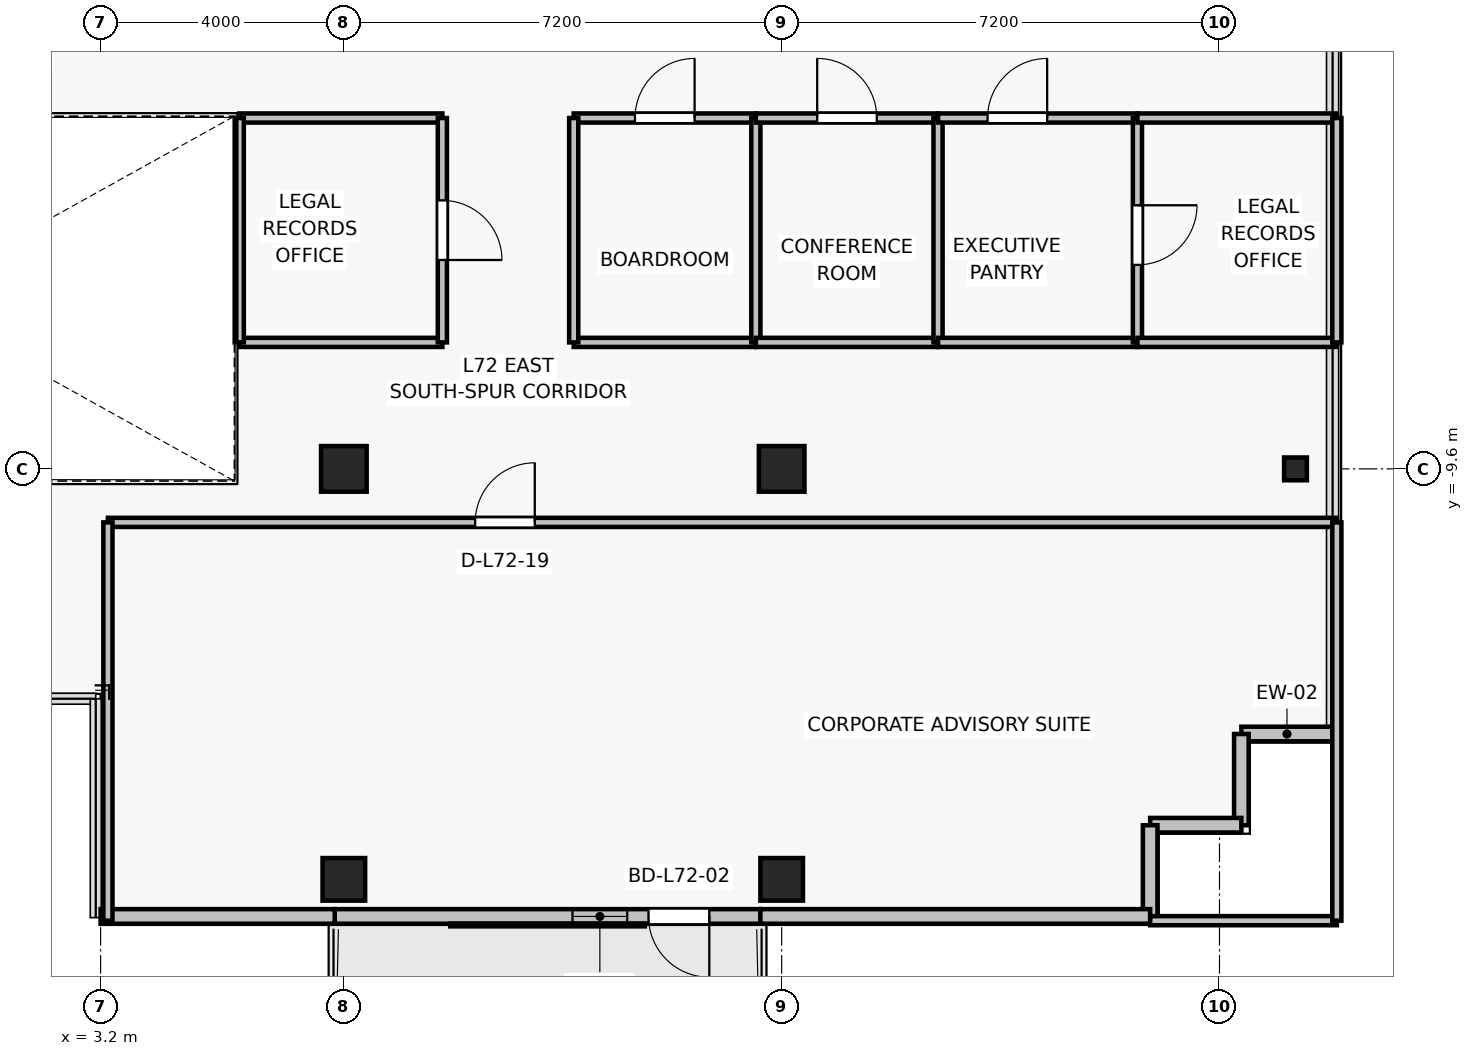
"""IFC4 building model, lengths in metres.
Left out: names, types, materials, properties, quantities, classifications, styles, units other than length and angle.
Written with IfcOpenShell. Run it as: python <this file> out.ifc"""

import sys

from ifc_helpers import new_model, si_unit, direction, frame, frame_2d, origin, origin_2d, place, context, subcontext, project, spatial, rectangle, i_section, extrude, source, transform, mapped, element, fill, save


model = new_model("IFC4")
c1 = context("Model", 3, precision=1e-05, world=origin(), true_north=direction((0.0, 1.0)))
c2 = subcontext(c1, "Body", "Model", "MODEL_VIEW")
j1 = project(units=[si_unit("LENGTHUNIT", "METRE"), si_unit("PLANEANGLEUNIT", "RADIAN")], contexts=[c1])
p1 = place(None, origin())
s1 = spatial("IfcSite", under=j1, at=p1, CompositionType="ELEMENT")
p2 = place(p1, origin())
s2 = spatial("IfcBuilding", under=s1, at=p2, CompositionType="ELEMENT")
p3 = place(p2, frame((0.0, 0.0, 255.1)))
s3 = spatial("IfcBuildingStorey", under=s2, at=p3, CompositionType="ELEMENT", Elevation=255.1)
for number, where, z_axis, x_axis in (
    (1, (7.2, -9.6, 0.0), (0.0, 0.0, 1.0), (1.0, 0.0, 0.0)),
    (2, (14.4, -9.6, 0.0), (0.0, 0.0, 1.0), (1.0, 0.0, 0.0)),
):
    element("IfcColumn", number, at=place(p3, frame(where, z_axis=z_axis, x_axis=x_axis)), inside=s3, PredefinedType="COLUMN", context=c2, shape_type="SweptSolid", body=[
        extrude(rectangle(XDim=0.75, YDim=0.75, at=origin_2d()), origin(), (0.0, 0.0, 1.0), 3.3),
    ])
for number, where, z_axis, x_axis in (
    (3, (7.2, -16.35, 0.0), (0.0, 0.0, 1.0), (1.0, 0.0, 0.0)),
    (4, (14.4, -16.35, 0.0), (0.0, 0.0, 1.0), (1.0, 0.0, 0.0)),
):
    element("IfcColumn", number, at=place(p3, frame(where, z_axis=z_axis, x_axis=x_axis)), inside=s3, PredefinedType="COLUMN", context=c2, shape_type="SweptSolid", body=[
        extrude(rectangle(XDim=0.7, YDim=0.7, at=origin_2d()), origin(), (0.0, 0.0, 1.0), 3.3),
    ])
p4 = place(p3, frame((22.85, -9.6, 0.0), z_axis=(0.0, 0.0, 1.0), x_axis=(1.0, 0.0, 0.0)))
e5 = element("IfcColumn", 5, at=p4, inside=s3, PredefinedType="COLUMN", context=c2, shape_type="SweptSolid", body=[
    extrude(i_section(OverallWidth=0.375, OverallDepth=0.375, WebThickness=0.017, FlangeThickness=0.027, FilletRadius=0.015, at=origin_2d()), origin(), (0.0, 0.0, 1.0), 3.3),
])
p5 = place(p3, frame((14.05, -16.96, 0.0), z_axis=(0.0, 0.0, 1.0), x_axis=(-1.0, 0.0, 0.0)))
e6 = element("IfcWall", 6, at=p5, inside=s3, PredefinedType="SOLIDWALL", context=c2, shape_type="SweptSolid", body=[
    extrude(rectangle(XDim=7.0, YDim=0.24, at=frame_2d((3.5, 0.0))), origin(), (0.0, 0.0, 1.0), 3.075),
])
p6 = place(p5, frame((0.84, 0.0, 0.0)))
e7 = element("IfcOpeningElement", 7, at=p6, cuts=e6, PredefinedType="OPENING", context=c2, shape_type="SweptSolid", body=[
    extrude(rectangle(XDim=1.0, YDim=2.2, at=frame_2d((0.5, 1.1))), frame((0.0, 0.13, 0.0), z_axis=(0.0, -1.0, 0.0), x_axis=(1.0, 0.0, 0.0)), (0.0, 0.0, 1.0), 0.26),
])
p7 = place(p5, frame((2.19, 0.0, 0.85)))
e8 = element("IfcOpeningElement", 8, at=p7, cuts=e6, PredefinedType="OPENING", context=c2, shape_type="SweptSolid", body=[
    extrude(rectangle(XDim=0.9, YDim=1.35, at=frame_2d((0.45, 0.675))), frame((0.0, 0.13, 0.0), z_axis=(0.0, -1.0, 0.0), x_axis=(1.0, 0.0, 0.0)), (0.0, 0.0, 1.0), 0.26),
])
for number, where, z_axis, x_axis in (
    (9, (21.96, -13.96, 0.0), (0.0, 0.0, 1.0), (1.0, 0.0, 0.0)),
    (10, (21.96, -15.46, 0.0), (0.0, 0.0, 1.0), (0.0, 1.0, 0.0)),
    (11, (20.46, -15.46, 0.0), (0.0, 0.0, 1.0), (1.0, 0.0, 0.0)),
    (12, (20.46, -16.96, 0.0), (0.0, 0.0, 1.0), (0.0, 1.0, 0.0)),
):
    element("IfcWall", number, at=place(p3, frame(where, z_axis=z_axis, x_axis=x_axis)), inside=s3, PredefinedType="SOLIDWALL", context=c2, shape_type="SweptSolid", body=[
        extrude(rectangle(XDim=1.5, YDim=0.24, at=frame_2d((0.75, 0.0))), origin(), (0.0, 0.0, 1.0), 3.075),
    ])
p8 = place(p3, frame((14.05, -16.96, 0.0), z_axis=(0.0, 0.0, 1.0), x_axis=(1.0, 0.0, 0.0)))
e13 = element("IfcWall", 13, at=p8, inside=s3, PredefinedType="SOLIDWALL", context=c2, shape_type="SweptSolid", body=[
    extrude(rectangle(XDim=6.41, YDim=0.24, at=frame_2d((3.205, 0.0))), origin(), (0.0, 0.0, 1.0), 3.075),
])
p9 = place(p3, frame((3.2, -16.96, 0.0), z_axis=(0.0, 0.0, 1.0), x_axis=(1.0, 0.0, 0.0)))
e14 = element("IfcWall", 14, at=p9, inside=s3, PredefinedType="SOLIDWALL", context=c2, shape_type="SweptSolid", body=[
    extrude(rectangle(XDim=3.85, YDim=0.24, at=frame_2d((1.925, 0.0))), origin(), (0.0, 0.0, 1.0), 3.075),
])
p10 = place(p3, frame((13.976, -7.52, 0.0), z_axis=(0.0, 0.0, 1.0), x_axis=(-1.0, 0.0, 0.0)))
e15 = element("IfcWall", 15, at=p10, inside=s3, PredefinedType="PARTITIONING", context=c2, shape_type="SweptSolid", body=[
    extrude(rectangle(XDim=2.996, YDim=0.15, at=frame_2d((1.498, 0.0))), origin(), (0.0, 0.0, 1.0), 3.075),
])
p11 = place(p3, frame((10.98, -3.83, 0.0), z_axis=(0.0, 0.0, 1.0), x_axis=(1.0, 0.0, 0.0)))
e16 = element("IfcWall", 16, at=p11, inside=s3, PredefinedType="PARTITIONING", context=c2, shape_type="SweptSolid", body=[
    extrude(rectangle(XDim=2.996, YDim=0.15, at=frame_2d((1.498, 0.0))), origin(), (0.0, 0.0, 1.0), 3.075),
])
p12 = place(p11, frame((1.008, 0.0, 0.0)))
e17 = element("IfcOpeningElement", 17, at=p12, cuts=e16, PredefinedType="OPENING", context=c2, shape_type="SweptSolid", body=[
    extrude(rectangle(XDim=0.98, YDim=2.15, at=frame_2d((0.49, 1.075))), frame((0.0, 0.085, 0.0), z_axis=(0.0, -1.0, 0.0), x_axis=(1.0, 0.0, 0.0)), (0.0, 0.0, 1.0), 0.17),
])
for number, where, z_axis, x_axis in (
    (18, (10.98, -7.52, 0.0), (0.0, 0.0, 1.0), (0.0, 1.0, 0.0)),
    (19, (13.976, -3.83, 0.0), (0.0, 0.0, 1.0), (0.0, -1.0, 0.0)),
):
    element("IfcWall", number, at=place(p3, frame(where, z_axis=z_axis, x_axis=x_axis)), inside=s3, PredefinedType="PARTITIONING", context=c2, shape_type="SweptSolid", body=[
        extrude(rectangle(XDim=3.69, YDim=0.15, at=frame_2d((1.845, 0.0))), origin(), (0.0, 0.0, 1.0), 2.705),
    ])
p13 = place(p3, frame((16.971, -7.52, 0.0), z_axis=(0.0, 0.0, 1.0), x_axis=(-1.0, 0.0, 0.0)))
e20 = element("IfcWall", 20, at=p13, inside=s3, PredefinedType="PARTITIONING", context=c2, shape_type="SweptSolid", body=[
    extrude(rectangle(XDim=2.996, YDim=0.15, at=frame_2d((1.498, 0.0))), origin(), (0.0, 0.0, 1.0), 2.615),
])
p14 = place(p3, frame((13.976, -3.83, 0.0), z_axis=(0.0, 0.0, 1.0), x_axis=(1.0, 0.0, 0.0)))
e21 = element("IfcWall", 21, at=p14, inside=s3, PredefinedType="PARTITIONING", context=c2, shape_type="SweptSolid", body=[
    extrude(rectangle(XDim=2.996, YDim=0.15, at=frame_2d((1.498, 0.0))), origin(), (0.0, 0.0, 1.0), 2.615),
])
p15 = place(p14, frame((1.008, 0.0, 0.0)))
e22 = element("IfcOpeningElement", 22, at=p15, cuts=e21, PredefinedType="OPENING", context=c2, shape_type="SweptSolid", body=[
    extrude(rectangle(XDim=0.98, YDim=2.15, at=frame_2d((0.49, 1.075))), frame((0.0, 0.085, 0.0), z_axis=(0.0, -1.0, 0.0), x_axis=(1.0, 0.0, 0.0)), (0.0, 0.0, 1.0), 0.17),
])
p16 = place(p3, frame((16.971, -3.83, 0.0), z_axis=(0.0, 0.0, 1.0), x_axis=(0.0, -1.0, 0.0)))
e23 = element("IfcWall", 23, at=p16, inside=s3, PredefinedType="PARTITIONING", context=c2, shape_type="SweptSolid", body=[
    extrude(rectangle(XDim=3.69, YDim=0.15, at=frame_2d((1.845, 0.0))), origin(), (0.0, 0.0, 1.0), 2.705),
])
p17 = place(p3, frame((20.251, -7.52, 0.0), z_axis=(0.0, 0.0, 1.0), x_axis=(-1.0, 0.0, 0.0)))
e24 = element("IfcWall", 24, at=p17, inside=s3, PredefinedType="PARTITIONING", context=c2, shape_type="SweptSolid", body=[
    extrude(rectangle(XDim=3.279, YDim=0.15, at=frame_2d((1.64, 0.0))), origin(), (0.0, 0.0, 1.0), 3.075),
])
p18 = place(p3, frame((16.971, -3.83, 0.0), z_axis=(0.0, 0.0, 1.0), x_axis=(1.0, 0.0, 0.0)))
e25 = element("IfcWall", 25, at=p18, inside=s3, PredefinedType="PARTITIONING", context=c2, shape_type="SweptSolid", body=[
    extrude(rectangle(XDim=3.279, YDim=0.15, at=frame_2d((1.64, 0.0))), origin(), (0.0, 0.0, 1.0), 3.075),
])
p19 = place(p18, frame((0.815, 0.0, 0.0)))
e26 = element("IfcOpeningElement", 26, at=p19, cuts=e25, PredefinedType="OPENING", context=c2, shape_type="SweptSolid", body=[
    extrude(rectangle(XDim=0.98, YDim=2.15, at=frame_2d((0.49, 1.075))), frame((0.0, 0.085, 0.0), z_axis=(0.0, -1.0, 0.0), x_axis=(1.0, 0.0, 0.0)), (0.0, 0.0, 1.0), 0.17),
])
p20 = place(p3, frame((20.251, -3.83, 0.0), z_axis=(0.0, 0.0, 1.0), x_axis=(0.0, -1.0, 0.0)))
e27 = element("IfcWall", 27, at=p20, inside=s3, PredefinedType="PARTITIONING", context=c2, shape_type="SweptSolid", body=[
    extrude(rectangle(XDim=3.69, YDim=0.15, at=frame_2d((1.845, 0.0))), origin(), (0.0, 0.0, 1.0), 2.705),
])
p21 = place(p20, frame((1.435, 0.0, 0.0)))
e28 = element("IfcOpeningElement", 28, at=p21, cuts=e27, PredefinedType="OPENING", context=c2, shape_type="SweptSolid", body=[
    extrude(rectangle(XDim=0.98, YDim=2.15, at=frame_2d((0.49, 1.075))), frame((0.0, 0.085, 0.0), z_axis=(0.0, -1.0, 0.0), x_axis=(1.0, 0.0, 0.0)), (0.0, 0.0, 1.0), 0.17),
])
for number, where, z_axis, x_axis in (
    (29, (23.53, -7.52, 0.0), (0.0, 0.0, 1.0), (-1.0, 0.0, 0.0)),
    (30, (20.251, -3.83, 0.0), (0.0, 0.0, 1.0), (1.0, 0.0, 0.0)),
):
    element("IfcWall", number, at=place(p3, frame(where, z_axis=z_axis, x_axis=x_axis)), inside=s3, PredefinedType="PARTITIONING", context=c2, shape_type="SweptSolid", body=[
        extrude(rectangle(XDim=3.279, YDim=0.15, at=frame_2d((1.64, 0.0))), origin(), (0.0, 0.0, 1.0), 2.765),
    ])
p22 = place(p3, frame((23.53, -3.83, 0.0), z_axis=(0.0, 0.0, 1.0), x_axis=(0.0, -1.0, 0.0)))
e31 = element("IfcWall", 31, at=p22, inside=s3, PredefinedType="PARTITIONING", context=c2, shape_type="SweptSolid", body=[
    extrude(rectangle(XDim=3.69, YDim=0.15, at=frame_2d((1.845, 0.0))), origin(), (0.0, 0.0, 1.0), 2.765),
])
p23 = place(p3, frame((23.53, -17.03, 0.0), z_axis=(0.0, 0.0, 1.0), x_axis=(-1.0, 0.0, 0.0)))
e32 = element("IfcWall", 32, at=p23, inside=s3, PredefinedType="PARTITIONING", context=c2, shape_type="SweptSolid", body=[
    extrude(rectangle(XDim=3.07, YDim=0.15, at=frame_2d((1.535, 0.0))), origin(), (0.0, 0.0, 1.0), 3.075),
])
p24 = place(p3, frame((3.32, -10.48, 0.0), z_axis=(0.0, 0.0, 1.0), x_axis=(1.0, 0.0, 0.0)))
e33 = element("IfcWall", 33, at=p24, inside=s3, PredefinedType="PARTITIONING", context=c2, shape_type="SweptSolid", body=[
    extrude(rectangle(XDim=20.21, YDim=0.15, at=frame_2d((10.105, 0.0))), origin(), (0.0, 0.0, 1.0), 2.615),
])
p25 = place(p24, frame((6.04, 0.0, 0.0)))
e34 = element("IfcOpeningElement", 34, at=p25, cuts=e33, PredefinedType="OPENING", context=c2, shape_type="SweptSolid", body=[
    extrude(rectangle(XDim=0.98, YDim=2.15, at=frame_2d((0.49, 1.075))), frame((0.0, 0.085, 0.0), z_axis=(0.0, -1.0, 0.0), x_axis=(1.0, 0.0, 0.0)), (0.0, 0.0, 1.0), 0.17),
])
for number, where, z_axis, x_axis in (
    (35, (3.32, -17.03, 0.0), (0.0, 0.0, 1.0), (0.0, 1.0, 0.0)),
    (36, (23.53, -10.48, 0.0), (0.0, 0.0, 1.0), (0.0, -1.0, 0.0)),
):
    element("IfcWall", number, at=place(p3, frame(where, z_axis=z_axis, x_axis=x_axis)), inside=s3, PredefinedType="PARTITIONING", context=c2, shape_type="SweptSolid", body=[
        extrude(rectangle(XDim=6.55, YDim=0.15, at=frame_2d((3.275, 0.0))), origin(), (0.0, 0.0, 1.0), 3.075),
    ])
for number, where, z_axis, x_axis in (
    (37, (8.82, -7.52, 0.0), (0.0, 0.0, 1.0), (-1.0, 0.0, 0.0)),
    (38, (5.48, -3.83, 0.0), (0.0, 0.0, 1.0), (1.0, 0.0, 0.0)),
):
    element("IfcWall", number, at=place(p3, frame(where, z_axis=z_axis, x_axis=x_axis)), inside=s3, PredefinedType="PARTITIONING", context=c2, shape_type="SweptSolid", body=[
        extrude(rectangle(XDim=3.34, YDim=0.15, at=frame_2d((1.67, 0.0))), origin(), (0.0, 0.0, 1.0), 2.615),
    ])
p26 = place(p3, frame((5.48, -7.52, 0.0), z_axis=(0.0, 0.0, 1.0), x_axis=(0.0, 1.0, 0.0)))
e39 = element("IfcWall", 39, at=p26, inside=s3, PredefinedType="PARTITIONING", context=c2, shape_type="SweptSolid", body=[
    extrude(rectangle(XDim=3.69, YDim=0.15, at=frame_2d((1.845, 0.0))), origin(), (0.0, 0.0, 1.0), 3.075),
])
p27 = place(p3, frame((8.82, -3.83, 0.0), z_axis=(0.0, 0.0, 1.0), x_axis=(0.0, -1.0, 0.0)))
e40 = element("IfcWall", 40, at=p27, inside=s3, PredefinedType="PARTITIONING", context=c2, shape_type="SweptSolid", body=[
    extrude(rectangle(XDim=3.69, YDim=0.15, at=frame_2d((1.845, 0.0))), origin(), (0.0, 0.0, 1.0), 2.705),
])
p28 = place(p27, frame((1.355, 0.0, 0.0)))
e41 = element("IfcOpeningElement", 41, at=p28, cuts=e40, PredefinedType="OPENING", context=c2, shape_type="SweptSolid", body=[
    extrude(rectangle(XDim=0.98, YDim=2.15, at=frame_2d((0.49, 1.075))), frame((0.0, 0.085, 0.0), z_axis=(0.0, -1.0, 0.0), x_axis=(1.0, 0.0, 0.0)), (0.0, 0.0, 1.0), 0.17),
])
m1 = source(origin(), c2, "Body", "SweptSolid", [
    extrude(rectangle(XDim=1.0, YDim=2.2, at=frame_2d((0.5, 1.1))), frame((0.0, 0.025, 0.0), z_axis=(0.0, -1.0, 0.0), x_axis=(1.0, 0.0, 0.0)), (0.0, 0.0, 1.0), 0.05),
])
p29 = place(p6, origin())
e42 = element("IfcDoor", 42, at=p29, inside=s3, OperationType="SINGLE_SWING_LEFT", PredefinedType="DOOR", context=c2, shape_type="MappedRepresentation", body=[
    mapped(m1, transform((0.0, 0.0, 0.0), x_axis=(1.0, 0.0, 0.0), y_axis=(0.0, 1.0, 0.0), z_axis=(0.0, 0.0, 1.0), scale=1.0)),
])
fill(e7, e42)
m2 = source(origin(), c2, "Body", "SweptSolid", [
    extrude(rectangle(XDim=0.9, YDim=1.35, at=frame_2d((0.45, 0.675))), frame((0.0, 0.03, 0.0), z_axis=(0.0, -1.0, 0.0), x_axis=(1.0, 0.0, 0.0)), (0.0, 0.0, 1.0), 0.06),
])
p30 = place(p7, origin())
e43 = element("IfcWindow", 43, at=p30, inside=s3, PartitioningType="SINGLE_PANEL", PredefinedType="WINDOW", context=c2, shape_type="MappedRepresentation", body=[
    mapped(m2, transform((0.0, 0.0, 0.0), x_axis=(1.0, 0.0, 0.0), y_axis=(0.0, 1.0, 0.0), z_axis=(0.0, 0.0, 1.0), scale=1.0)),
])
fill(e8, e43)
m3 = source(origin(), c2, "Body", "SweptSolid", [
    extrude(rectangle(XDim=0.98, YDim=2.15, at=frame_2d((0.49, 1.075))), frame((0.0, 0.025, 0.0), z_axis=(0.0, -1.0, 0.0), x_axis=(1.0, 0.0, 0.0)), (0.0, 0.0, 1.0), 0.05),
])
p31 = place(p12, origin())
e44 = element("IfcDoor", 44, at=p31, inside=s3, OperationType="SINGLE_SWING_RIGHT", PredefinedType="DOOR", context=c2, shape_type="MappedRepresentation", body=[
    mapped(m3, transform((0.0, 0.0, 0.0), x_axis=(1.0, 0.0, 0.0), y_axis=(0.0, 1.0, 0.0), z_axis=(0.0, 0.0, 1.0), scale=1.0)),
])
fill(e17, e44)
p32 = place(p15, origin())
e45 = element("IfcDoor", 45, at=p32, inside=s3, OperationType="SINGLE_SWING_LEFT", PredefinedType="DOOR", context=c2, shape_type="MappedRepresentation", body=[
    mapped(m3, transform((0.0, 0.0, 0.0), x_axis=(1.0, 0.0, 0.0), y_axis=(0.0, 1.0, 0.0), z_axis=(0.0, 0.0, 1.0), scale=1.0)),
])
fill(e22, e45)
p33 = place(p19, origin())
e46 = element("IfcDoor", 46, at=p33, inside=s3, OperationType="SINGLE_SWING_RIGHT", PredefinedType="DOOR", context=c2, shape_type="MappedRepresentation", body=[
    mapped(m3, transform((0.0, 0.0, 0.0), x_axis=(1.0, 0.0, 0.0), y_axis=(0.0, 1.0, 0.0), z_axis=(0.0, 0.0, 1.0), scale=1.0)),
])
fill(e26, e46)
p34 = place(p21, origin())
e47 = element("IfcDoor", 47, at=p34, inside=s3, OperationType="SINGLE_SWING_LEFT", PredefinedType="DOOR", context=c2, shape_type="MappedRepresentation", body=[
    mapped(m3, transform((0.0, 0.0, 0.0), x_axis=(1.0, 0.0, 0.0), y_axis=(0.0, 1.0, 0.0), z_axis=(0.0, 0.0, 1.0), scale=1.0)),
])
fill(e28, e47)
p35 = place(p25, origin())
e48 = element("IfcDoor", 48, at=p35, inside=s3, OperationType="SINGLE_SWING_RIGHT", PredefinedType="DOOR", context=c2, shape_type="MappedRepresentation", body=[
    mapped(m3, transform((0.0, 0.0, 0.0), x_axis=(1.0, 0.0, 0.0), y_axis=(0.0, 1.0, 0.0), z_axis=(0.0, 0.0, 1.0), scale=1.0)),
])
fill(e34, e48)
p36 = place(p28, origin())
e49 = element("IfcDoor", 49, at=p36, inside=s3, OperationType="SINGLE_SWING_RIGHT", PredefinedType="DOOR", context=c2, shape_type="MappedRepresentation", body=[
    mapped(m3, transform((0.0, 0.0, 0.0), x_axis=(1.0, 0.0, 0.0), y_axis=(0.0, 1.0, 0.0), z_axis=(0.0, 0.0, 1.0), scale=1.0)),
])
fill(e41, e49)
save(model, sys.argv[1])
